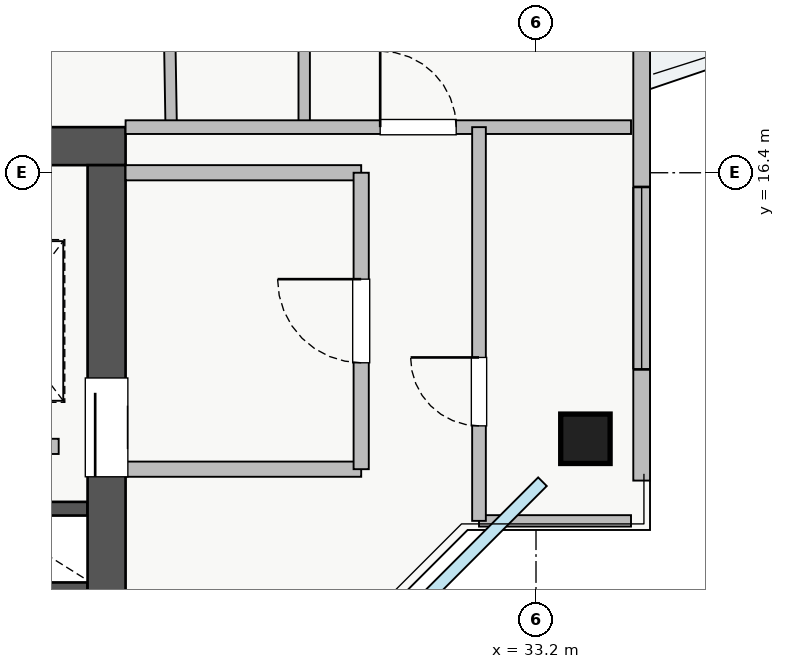
"""IFC4 building model, lengths in metres.
Left out: names, types, materials, properties, quantities, classifications, styles, units other than length and angle.
Written with IfcOpenShell. Run it as: python <this file> out.ifc"""

import sys

from ifc_helpers import new_model, si_unit, direction, frame, frame_2d, origin, origin_2d, place, context, subcontext, project, spatial, rectangle, extrude, source, transform, mapped, element, fill, save


model = new_model("IFC4")
c1 = context("Model", 3, precision=1e-05, world=origin(), true_north=direction((0.0, 1.0)))
c2 = subcontext(c1, "Body", "Model", "MODEL_VIEW")
j1 = project(units=[si_unit("LENGTHUNIT", "METRE"), si_unit("PLANEANGLEUNIT", "RADIAN")], contexts=[c1])
p1 = place(None, origin())
s1 = spatial("IfcSite", under=j1, at=p1, CompositionType="ELEMENT")
p2 = place(p1, origin())
s2 = spatial("IfcBuilding", under=s1, at=p2, CompositionType="ELEMENT")
p3 = place(p2, frame((0.0, 0.0, 256.75)))
s3 = spatial("IfcBuildingStorey", under=s2, at=p3, CompositionType="ELEMENT", Elevation=256.75)
for number, where, z_axis, x_axis in (
    (1, (25.8, 11.98, 0.0), (0.0, 0.0, 1.0), (1.0, 0.0, 0.0)),
    (2, (25.8, 10.92, 0.0), (0.0, 0.0, 1.0), (1.0, 0.0, 0.0)),
):
    element("IfcWall", number, at=place(p3, frame(where, z_axis=z_axis, x_axis=x_axis)), inside=s3, PredefinedType="SHEAR", context=c2, shape_type="SweptSolid", body=[
        extrude(rectangle(XDim=1.5, YDim=0.18, at=frame_2d((0.75, 0.0))), origin(), (0.0, 0.0, 1.0), 3.07),
    ])
p4 = place(p3, frame((10.2, 16.75, 0.0), z_axis=(0.0, 0.0, 1.0), x_axis=(1.0, 0.0, 0.0)))
e3 = element("IfcWall", 3, at=p4, inside=s3, PredefinedType="SHEAR", context=c2, shape_type="SweptSolid", body=[
    extrude(rectangle(XDim=17.6, YDim=0.5, at=frame_2d((8.8, 0.0))), origin(), (0.0, 0.0, 1.0), 3.25),
])
p5 = place(p3, frame((27.55, 10.3, 0.0), z_axis=(0.0, 0.0, 1.0), x_axis=(0.0, 1.0, 0.0)))
e4 = element("IfcWall", 4, at=p5, inside=s3, PredefinedType="SHEAR", context=c2, shape_type="SweptSolid", body=[
    extrude(rectangle(XDim=6.2, YDim=0.5, at=frame_2d((3.1, 0.0))), origin(), (0.0, 0.0, 1.0), 3.25),
])
p6 = place(p5, frame((2.1, 0.0, 0.0)))
e5 = element("IfcOpeningElement", 5, at=p6, cuts=e4, PredefinedType="OPENING", context=c2, shape_type="SweptSolid", body=[
    extrude(rectangle(XDim=1.3, YDim=2.05, at=frame_2d((0.65, 1.025))), frame((0.0, 0.26, 0.0), z_axis=(0.0, -1.0, 0.0), x_axis=(1.0, 0.0, 0.0)), (0.0, 0.0, 1.0), 0.52),
])
m1 = source(origin(), c2, "Body", "SweptSolid", [
    extrude(rectangle(XDim=0.65, YDim=0.65, at=origin_2d()), origin(), (0.0, 0.0, 1.0), 3.25),
])
p7 = place(p3, frame((33.85, 12.9, 0.0), z_axis=(0.0, 0.0, 1.0), x_axis=(1.0, 0.0, 0.0)))
e6 = element("IfcColumn", 6, at=p7, inside=s3, PredefinedType="COLUMN", context=c2, shape_type="MappedRepresentation", body=[
    mapped(m1, transform((0.0, 0.0, 0.0), x_axis=(1.0, 0.0, 0.0), y_axis=(0.0, 1.0, 0.0), z_axis=(0.0, 0.0, 1.0), scale=1.0)),
])
p8 = place(p3, frame((34.59, 12.35, 0.0), z_axis=(0.0, 0.0, 1.0), x_axis=(0.0, 1.0, 0.0)))
e7 = element("IfcWall", 7, at=p8, inside=s3, PredefinedType="STANDARD", context=c2, shape_type="SweptSolid", body=[
    extrude(rectangle(XDim=21.3, YDim=0.22, at=frame_2d((10.65, 0.0))), origin(), (0.0, 0.0, 1.0), 2.61),
])
p9 = place(p8, frame((11.5, 0.0, 0.0)))
e8 = element("IfcOpeningElement", 8, at=p9, cuts=e7, PredefinedType="OPENING", context=c2, shape_type="SweptSolid", body=[
    extrude(rectangle(XDim=1.2, YDim=2.1, at=frame_2d((0.6, 1.05))), frame((0.0, 0.12, 0.0), z_axis=(0.0, -1.0, 0.0), x_axis=(1.0, 0.0, 0.0)), (0.0, 0.0, 1.0), 0.24),
])
p10 = place(p8, frame((1.463, 0.0, 0.9)))
e9 = element("IfcOpeningElement", 9, at=p10, cuts=e7, PredefinedType="OPENING", context=c2, shape_type="SweptSolid", body=[
    extrude(rectangle(XDim=2.4, YDim=1.48, at=frame_2d((1.2, 0.74))), frame((0.0, 0.12, 0.0), z_axis=(0.0, -1.0, 0.0), x_axis=(1.0, 0.0, 0.0)), (0.0, 0.0, 1.0), 0.24),
])
p11 = place(p8, frame((17.588, 0.0, 0.9)))
e10 = element("IfcOpeningElement", 10, at=p11, cuts=e7, PredefinedType="OPENING", context=c2, shape_type="SweptSolid", body=[
    extrude(rectangle(XDim=2.1, YDim=1.48, at=frame_2d((1.05, 0.74))), frame((0.0, 0.12, 0.0), z_axis=(0.0, -1.0, 0.0), x_axis=(1.0, 0.0, 0.0)), (0.0, 0.0, 1.0), 0.24),
])
for number, where, z_axis, x_axis in (
    (11, (27.8, 16.4, 0.0), (0.0, 0.0, 1.0), (1.0, 0.0, 0.0)),
    (12, (27.8, 12.5, 0.0), (0.0, 0.0, 1.0), (1.0, 0.0, 0.0)),
):
    element("IfcWall", number, at=place(p3, frame(where, z_axis=z_axis, x_axis=x_axis)), inside=s3, PredefinedType="PARTITIONING", context=c2, shape_type="SweptSolid", body=[
        extrude(rectangle(XDim=3.1, YDim=0.2, at=frame_2d((1.55, 0.0))), origin(), (0.0, 0.0, 1.0), 3.07),
    ])
p12 = place(p3, frame((30.9, 12.5, 0.0), z_axis=(0.0, 0.0, 1.0), x_axis=(0.0, 1.0, 0.0)))
e13 = element("IfcWall", 13, at=p12, inside=s3, PredefinedType="PARTITIONING", context=c2, shape_type="SweptSolid", body=[
    extrude(rectangle(XDim=3.9, YDim=0.2, at=frame_2d((1.95, 0.0))), origin(), (0.0, 0.0, 1.0), 2.815),
])
p13 = place(p12, frame((1.4, 0.0, 0.0)))
e14 = element("IfcOpeningElement", 14, at=p13, cuts=e13, PredefinedType="OPENING", context=c2, shape_type="SweptSolid", body=[
    extrude(rectangle(XDim=1.1, YDim=2.05, at=frame_2d((0.55, 1.025))), frame((0.0, 0.11, 0.0), z_axis=(0.0, -1.0, 0.0), x_axis=(1.0, 0.0, 0.0)), (0.0, 0.0, 1.0), 0.22),
])
p14 = place(p3, frame((21.75, 12.8, 0.0), z_axis=(0.0, 0.0, 1.0), x_axis=(1.0, 0.0, 0.0)))
e15 = element("IfcWall", 15, at=p14, inside=s3, PredefinedType="PARTITIONING", context=c2, shape_type="SweptSolid", body=[
    extrude(rectangle(XDim=5.17, YDim=0.2, at=frame_2d((2.585, 0.0))), origin(), (0.0, 0.0, 1.0), 3.07),
])
p15 = place(p3, frame((28.2, 29.0, 0.0), z_axis=(0.0, 0.0, 1.0), x_axis=(0.016660285018, -0.99986120782, 0.0)))
e16 = element("IfcWall", 16, at=p15, inside=s3, PredefinedType="PARTITIONING", context=c2, shape_type="SweptSolid", body=[
    extrude(rectangle(XDim=12.002, YDim=0.15, at=frame_2d((6.001, 0.0))), origin(), (0.0, 0.0, 1.0), 3.07),
])
p16 = place(p15, frame((5.902, 0.0, 0.0)))
e17 = element("IfcOpeningElement", 17, at=p16, cuts=e16, PredefinedType="OPENING", context=c2, shape_type="SweptSolid", body=[
    extrude(rectangle(XDim=0.9, YDim=2.05, at=frame_2d((0.45, 1.025))), frame((0.0, 0.085, 0.0), z_axis=(0.0, -1.0, 0.0), x_axis=(1.0, 0.0, 0.0)), (0.0, 0.0, 1.0), 0.17),
])
p17 = place(p3, frame((30.15, 17.0, 0.0), z_axis=(0.0, 0.0, 1.0), x_axis=(0.0, 1.0, 0.0)))
e18 = element("IfcWall", 18, at=p17, inside=s3, PredefinedType="PARTITIONING", context=c2, shape_type="SweptSolid", body=[
    extrude(rectangle(XDim=12.0, YDim=0.15, at=frame_2d((6.0, 0.0))), origin(), (0.0, 0.0, 1.0), 3.07),
])
p18 = place(p17, frame((5.2, 0.0, 0.0)))
e19 = element("IfcOpeningElement", 19, at=p18, cuts=e18, PredefinedType="OPENING", context=c2, shape_type="SweptSolid", body=[
    extrude(rectangle(XDim=0.9, YDim=2.05, at=frame_2d((0.45, 1.025))), frame((0.0, 0.085, 0.0), z_axis=(0.0, -1.0, 0.0), x_axis=(1.0, 0.0, 0.0)), (0.0, 0.0, 1.0), 0.17),
])
p19 = place(p3, frame((27.8, 17.0, 0.0), z_axis=(0.0, 0.0, 1.0), x_axis=(1.0, 0.0, 0.0)))
e20 = element("IfcWall", 20, at=p19, inside=s3, PredefinedType="PARTITIONING", context=c2, shape_type="SweptSolid", body=[
    extrude(rectangle(XDim=6.65, YDim=0.18, at=frame_2d((3.325, 0.0))), origin(), (0.0, 0.0, 1.0), 3.07),
])
p20 = place(p19, frame((3.35, 0.0, 0.0)))
e21 = element("IfcOpeningElement", 21, at=p20, cuts=e20, PredefinedType="OPENING", context=c2, shape_type="SweptSolid", body=[
    extrude(rectangle(XDim=1.0, YDim=2.05, at=frame_2d((0.5, 1.025))), frame((0.0, 0.1, 0.0), z_axis=(0.0, -1.0, 0.0), x_axis=(1.0, 0.0, 0.0)), (0.0, 0.0, 1.0), 0.2),
])
p21 = place(p3, frame((32.45, 11.82, 0.0), z_axis=(0.0, 0.0, 1.0), x_axis=(1.0, 0.0, 0.0)))
e22 = element("IfcWall", 22, at=p21, inside=s3, PredefinedType="PARTITIONING", context=c2, shape_type="SweptSolid", body=[
    extrude(rectangle(XDim=2.0, YDim=0.15, at=frame_2d((1.0, 0.0))), origin(), (0.0, 0.0, 1.0), 3.07),
])
p22 = place(p3, frame((32.45, 11.82, 0.0), z_axis=(0.0, 0.0, 1.0), x_axis=(0.0, 1.0, 0.0)))
e23 = element("IfcWall", 23, at=p22, inside=s3, PredefinedType="PARTITIONING", context=c2, shape_type="SweptSolid", body=[
    extrude(rectangle(XDim=5.18, YDim=0.18, at=frame_2d((2.59, 0.0))), origin(), (0.0, 0.0, 1.0), 3.07),
])
p23 = place(p22, frame((1.25, 0.0, 0.0)))
e24 = element("IfcOpeningElement", 24, at=p23, cuts=e23, PredefinedType="OPENING", context=c2, shape_type="SweptSolid", body=[
    extrude(rectangle(XDim=0.9, YDim=2.05, at=frame_2d((0.45, 1.025))), frame((0.0, 0.1, 0.0), z_axis=(0.0, -1.0, 0.0), x_axis=(1.0, 0.0, 0.0)), (0.0, 0.0, 1.0), 0.2),
])
m2 = source(origin(), c2, "Body", "SweptSolid", [
    extrude(rectangle(XDim=2.4, YDim=1.48, at=frame_2d((1.2, 0.74))), frame((0.0, 0.03, 0.0), z_axis=(0.0, -1.0, 0.0), x_axis=(1.0, 0.0, 0.0)), (0.0, 0.0, 1.0), 0.06),
])
p24 = place(p10, origin())
e25 = element("IfcWindow", 25, at=p24, inside=s3, PartitioningType="TRIPLE_PANEL_VERTICAL", PredefinedType="WINDOW", context=c2, shape_type="MappedRepresentation", body=[
    mapped(m2, transform((0.0, 0.0, 0.0), x_axis=(1.0, 0.0, 0.0), y_axis=(0.0, 1.0, 0.0), z_axis=(0.0, 0.0, 1.0), scale=1.0)),
])
fill(e9, e25)
m3 = source(origin(), c2, "Body", "SweptSolid", [
    extrude(rectangle(XDim=1.3, YDim=2.05, at=frame_2d((0.65, 1.025))), frame((0.0, 0.025, 0.0), z_axis=(0.0, -1.0, 0.0), x_axis=(1.0, 0.0, 0.0)), (0.0, 0.0, 1.0), 0.05),
])
p25 = place(p6, origin())
e26 = element("IfcDoor", 26, at=p25, inside=s3, OperationType="SLIDING_TO_RIGHT", PredefinedType="DOOR", context=c2, shape_type="MappedRepresentation", body=[
    mapped(m3, transform((0.0, 0.0, 0.0), x_axis=(1.0, 0.0, 0.0), y_axis=(0.0, 1.0, 0.0), z_axis=(0.0, 0.0, 1.0), scale=1.0)),
])
fill(e5, e26)
m4 = source(origin(), c2, "Body", "SweptSolid", [
    extrude(rectangle(XDim=1.1, YDim=2.05, at=frame_2d((0.55, 1.025))), frame((0.0, 0.025, 0.0), z_axis=(0.0, -1.0, 0.0), x_axis=(1.0, 0.0, 0.0)), (0.0, 0.0, 1.0), 0.05),
])
p26 = place(p13, origin())
e27 = element("IfcDoor", 27, at=p26, inside=s3, OperationType="SINGLE_SWING_RIGHT", PredefinedType="DOOR", context=c2, shape_type="MappedRepresentation", body=[
    mapped(m4, transform((0.0, 0.0, 0.0), x_axis=(1.0, 0.0, 0.0), y_axis=(0.0, 1.0, 0.0), z_axis=(0.0, 0.0, 1.0), scale=1.0)),
])
fill(e14, e27)
m5 = source(origin(), c2, "Body", "SweptSolid", [
    extrude(rectangle(XDim=1.0, YDim=2.05, at=frame_2d((0.5, 1.025))), frame((0.0, 0.025, 0.0), z_axis=(0.0, -1.0, 0.0), x_axis=(1.0, 0.0, 0.0)), (0.0, 0.0, 1.0), 0.05),
])
p27 = place(p20, origin())
e28 = element("IfcDoor", 28, at=p27, inside=s3, OperationType="SINGLE_SWING_LEFT", PredefinedType="DOOR", context=c2, shape_type="MappedRepresentation", body=[
    mapped(m5, transform((0.0, 0.0, 0.0), x_axis=(1.0, 0.0, 0.0), y_axis=(0.0, 1.0, 0.0), z_axis=(0.0, 0.0, 1.0), scale=1.0)),
])
fill(e21, e28)
m6 = source(origin(), c2, "Body", "SweptSolid", [
    extrude(rectangle(XDim=0.9, YDim=2.05, at=frame_2d((0.45, 1.025))), frame((0.0, 0.025, 0.0), z_axis=(0.0, -1.0, 0.0), x_axis=(1.0, 0.0, 0.0)), (0.0, 0.0, 1.0), 0.05),
])
p28 = place(p23, origin())
e29 = element("IfcDoor", 29, at=p28, inside=s3, OperationType="SINGLE_SWING_RIGHT", PredefinedType="DOOR", context=c2, shape_type="MappedRepresentation", body=[
    mapped(m6, transform((0.0, 0.0, 0.0), x_axis=(1.0, 0.0, 0.0), y_axis=(0.0, 1.0, 0.0), z_axis=(0.0, 0.0, 1.0), scale=1.0)),
])
fill(e24, e29)
save(model, sys.argv[1])
